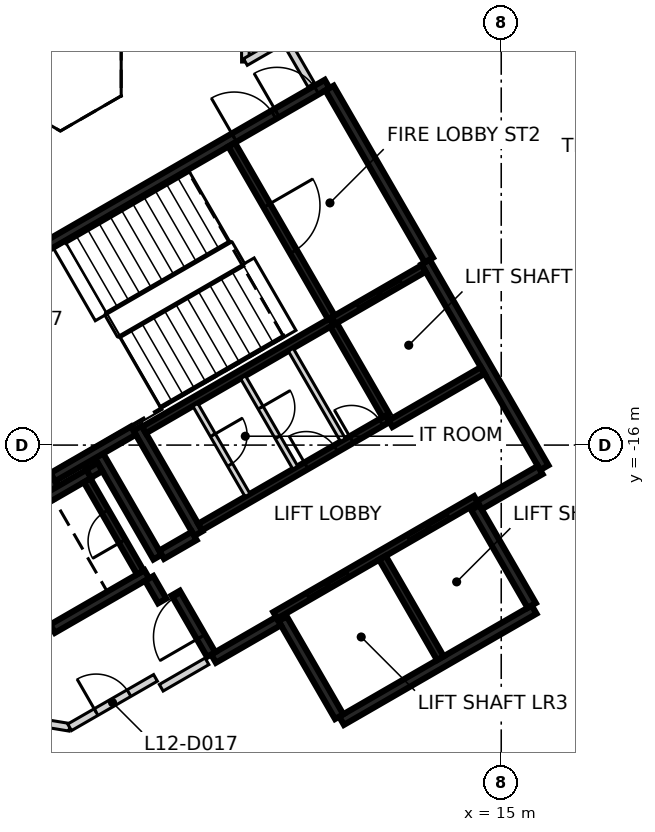
"""IFC4 building model, lengths in metres.
Left out: names, types, materials, properties, quantities, classifications, styles, units other than length and angle.
Written with IfcOpenShell. Run it as: python <this file> out.ifc"""

import sys

from ifc_helpers import new_model, si_unit, direction, frame, frame_2d, origin, place, context, subcontext, project, spatial, rectangle, extrude, element, fill, save


model = new_model("IFC4")
c1 = context("Model", 3, precision=1e-05, world=origin(), true_north=direction((0.0, 1.0)))
c2 = subcontext(c1, "Body", "Model", "MODEL_VIEW")
j1 = project(units=[si_unit("LENGTHUNIT", "METRE"), si_unit("PLANEANGLEUNIT", "RADIAN")], contexts=[c1])
p1 = place(None, origin())
s1 = spatial("IfcSite", under=j1, at=p1, CompositionType="ELEMENT")
p2 = place(p1, origin())
s2 = spatial("IfcBuilding", under=s1, at=p2, CompositionType="ELEMENT")
p3 = place(p2, frame((0.0, 0.0, 56.6)))
s3 = spatial("IfcBuildingStorey", under=s2, at=p3, CompositionType="ELEMENT", Elevation=56.6)
p4 = place(p3, frame((0.417, -12.273, 0.0), z_axis=(0.0, 0.0, 1.0), x_axis=(0.866021906294, 0.500006057782, 0.0)))
e1 = element("IfcWall", 1, at=p4, inside=s3, PredefinedType="SHEAR", context=c2, shape_type="SweptSolid", body=[
    extrude(rectangle(XDim=11.55, YDim=0.25, at=frame_2d((5.775, 0.0))), origin(), (0.0, 0.0, 1.0), 3.125),
])
p5 = place(p4, frame((10.025, 0.0, 0.0)))
e2 = element("IfcOpeningElement", 2, at=p5, cuts=e1, PredefinedType="OPENING", context=c2, shape_type="SweptSolid", body=[
    extrude(rectangle(XDim=1.2, YDim=2.1, at=frame_2d((0.6, 1.05))), frame((0.0, 0.135, 0.0), z_axis=(0.0, -1.0, 0.0), x_axis=(1.0, 0.0, 0.0)), (0.0, 0.0, 1.0), 0.27),
])
p6 = place(p4, frame((8.725, 0.0, 0.0)))
e3 = element("IfcOpeningElement", 3, at=p6, cuts=e1, PredefinedType="OPENING", context=c2, shape_type="SweptSolid", body=[
    extrude(rectangle(XDim=1.2, YDim=2.1, at=frame_2d((0.6, 1.05))), frame((0.0, 0.135, 0.0), z_axis=(0.0, -1.0, 0.0), x_axis=(1.0, 0.0, 0.0)), (0.0, 0.0, 1.0), 0.27),
])
p7 = place(p3, frame((13.008, -11.181, 0.0), z_axis=(0.0, 0.0, 1.0), x_axis=(0.500004234368, -0.866022959057, 0.0)))
e4 = element("IfcWall", 4, at=p7, inside=s3, PredefinedType="SHEAR", context=c2, shape_type="SweptSolid", body=[
    extrude(rectangle(XDim=6.25, YDim=0.25, at=frame_2d((3.125, 0.0))), origin(), (0.0, 0.0, 1.0), 3.125),
])
p8 = place(p3, frame((15.865, -20.328, 0.0), z_axis=(0.0, 0.0, 1.0), x_axis=(-0.86602852612, -0.499994591916, 0.0)))
e5 = element("IfcWall", 5, at=p8, inside=s3, PredefinedType="SHEAR", context=c2, shape_type="SweptSolid", body=[
    extrude(rectangle(XDim=5.85, YDim=0.25, at=frame_2d((2.925, 0.0))), origin(), (0.0, 0.0, 1.0), 3.125),
])
p9 = place(p3, frame((3.235, -17.153, 0.0), z_axis=(0.0, 0.0, 1.0), x_axis=(-0.500008851346, 0.866020293397, 0.0)))
e6 = element("IfcWall", 6, at=p9, inside=s3, PredefinedType="SHEAR", context=c2, shape_type="SweptSolid", body=[
    extrude(rectangle(XDim=5.51, YDim=0.25, at=frame_2d((2.755, 0.0))), origin(), (0.0, 0.0, 1.0), 3.125),
])
p10 = place(p3, frame((10.483, -6.606, 0.0), z_axis=(0.0, 0.0, 1.0), x_axis=(0.49999885962, -0.866026062182, 0.0)))
e7 = element("IfcWall", 7, at=p10, inside=s3, PredefinedType="SHEAR", context=c2, shape_type="SweptSolid", body=[
    extrude(rectangle(XDim=5.225, YDim=0.25, at=frame_2d((2.612, 0.0))), origin(), (0.0, 0.0, 1.0), 3.125),
])
p11 = place(p3, frame((7.031, -18.327, 0.0), z_axis=(0.0, 0.0, 1.0), x_axis=(-0.499971222258, 0.866042017984, 0.0)))
e8 = element("IfcWall", 8, at=p11, inside=s3, PredefinedType="SHEAR", context=c2, shape_type="SweptSolid", body=[
    extrude(rectangle(XDim=3.2, YDim=0.25, at=frame_2d((1.6, 0.0))), origin(), (0.0, 0.0, 1.0), 3.125),
])
for number, where, z_axis, x_axis in (
    (9, (14.315, -17.644, 0.0), (0.0, 0.0, 1.0), (0.5, -0.866, 0.0)),
    (10, (10.736, -23.145, 0.0), (0.0, 0.0, 1.0), (-0.5, 0.866, 0.0)),
):
    element("IfcWall", number, at=place(p3, frame(where, z_axis=z_axis, x_axis=x_axis)), inside=s3, PredefinedType="SHEAR", context=c2, shape_type="SweptSolid", body=[
        extrude(rectangle(XDim=2.974, YDim=0.25, at=frame_2d((1.487, 0.0))), origin(), (0.0, 0.0, 1.0), 3.125),
    ])
p12 = place(p3, frame((3.085, -20.894, 0.0), z_axis=(0.0, 0.0, 1.0), x_axis=(-0.499978833458, 0.866037623948, 0.0)))
e11 = element("IfcWall", 11, at=p12, inside=s3, PredefinedType="SHEAR", context=c2, shape_type="SweptSolid", body=[
    extrude(rectangle(XDim=3.05, YDim=0.25, at=frame_2d((1.525, 0.0))), origin(), (0.0, 0.0, 1.0), 3.125),
])
p13 = place(p3, frame((1.669, -18.19, 0.0), z_axis=(0.0, 0.0, 1.0), x_axis=(0.866042235819, 0.499970844928, 0.0)))
e12 = element("IfcWall", 12, at=p13, inside=s3, PredefinedType="SHEAR", context=c2, shape_type="SweptSolid", body=[
    extrude(rectangle(XDim=2.865, YDim=0.25, at=frame_2d((1.432, 0.0))), origin(), (0.0, 0.0, 1.0), 3.125),
])
p14 = place(p3, frame((5.675, -19.399, 0.0), z_axis=(0.0, 0.0, 1.0), x_axis=(-0.866026637627, -0.499997862916, 0.0)))
e13 = element("IfcWall", 13, at=p14, inside=s3, PredefinedType="SHEAR", context=c2, shape_type="SweptSolid", body=[
    extrude(rectangle(XDim=2.865, YDim=0.25, at=frame_2d((1.432, 0.0))), origin(), (0.0, 0.0, 1.0), 3.125),
])
p15 = place(p3, frame((4.414, -16.276, 0.0), z_axis=(0.0, 0.0, 1.0), x_axis=(0.500003324108, -0.866023484601, 0.0)))
e14 = element("IfcWall", 14, at=p15, inside=s3, PredefinedType="SHEAR", context=c2, shape_type="SweptSolid", body=[
    extrude(rectangle(XDim=3.085, YDim=0.25, at=frame_2d((1.542, 0.0))), origin(), (0.0, 0.0, 1.0), 3.125),
])
p16 = place(p3, frame((5.322, -15.619, 0.0), z_axis=(0.0, 0.0, 1.0), x_axis=(-0.866026229868, -0.499998569178, 0.0)))
e15 = element("IfcWall", 15, at=p16, inside=s3, PredefinedType="SHEAR", context=c2, shape_type="SweptSolid", body=[
    extrude(rectangle(XDim=2.449, YDim=0.25, at=frame_2d((1.225, 0.0))), origin(), (0.0, 0.0, 1.0), 3.125),
])
p17 = place(p3, frame((9.14, -20.631, 0.0), z_axis=(0.0, 0.0, 1.0), x_axis=(-0.866043531843, -0.499968599967, 0.0)))
e16 = element("IfcWall", 16, at=p17, inside=s3, PredefinedType="SHEAR", context=c2, shape_type="SweptSolid", body=[
    extrude(rectangle(XDim=1.975, YDim=0.25, at=frame_2d((0.987, 0.0))), origin(), (0.0, 0.0, 1.0), 3.125),
])
p18 = place(p3, frame((16.025, -16.656, 0.0), z_axis=(0.0, 0.0, 1.0), x_axis=(-0.866016279763, -0.500015802937, 0.0)))
e17 = element("IfcWall", 17, at=p18, inside=s3, PredefinedType="SHEAR", context=c2, shape_type="SweptSolid", body=[
    extrude(rectangle(XDim=1.849, YDim=0.25, at=frame_2d((0.925, 0.0))), origin(), (0.0, 0.0, 1.0), 3.125),
])
p19 = place(p3, frame((7.367, -21.51, 0.0), z_axis=(0.0, 0.0, 1.0), x_axis=(-0.499983108224, 0.866035156036, 0.0)))
e18 = element("IfcWall", 18, at=p19, inside=s3, PredefinedType="SHEAR", context=c2, shape_type="SweptSolid", body=[
    extrude(rectangle(XDim=1.865, YDim=0.25, at=frame_2d((0.932, 0.0))), origin(), (0.0, 0.0, 1.0), 3.125),
])
p20 = place(p19, frame((0.535, 0.0, 0.0)))
e19 = element("IfcOpeningElement", 19, at=p20, cuts=e18, PredefinedType="OPENING", context=c2, shape_type="SweptSolid", body=[
    extrude(rectangle(XDim=1.25, YDim=2.1, at=frame_2d((0.625, 1.05))), frame((0.0, 0.135, 0.0), z_axis=(0.0, -1.0, 0.0), x_axis=(1.0, 0.0, 0.0)), (0.0, 0.0, 1.0), 0.27),
])
p21 = place(p3, frame((6.065, -18.885, 0.0), z_axis=(0.0, 0.0, 1.0), x_axis=(0.866017078145, 0.500014420154, 0.0)))
e20 = element("IfcWall", 20, at=p21, inside=s3, PredefinedType="SHEAR", context=c2, shape_type="SweptSolid", body=[
    extrude(rectangle(XDim=0.989, YDim=0.25, at=frame_2d((0.495, 0.0))), origin(), (0.0, 0.0, 1.0), 3.125),
])
p22 = place(p3, frame((6.08, -20.1, 0.0), z_axis=(0.0, 0.0, 1.0), x_axis=(-0.500051773299, 0.865995510393, 0.0)))
e21 = element("IfcWall", 21, at=p22, inside=s3, PredefinedType="SHEAR", context=c2, shape_type="SweptSolid", body=[
    extrude(rectangle(XDim=0.685, YDim=0.25, at=frame_2d((0.342, 0.0))), origin(), (0.0, 0.0, 1.0), 3.125),
])
p23 = place(p3, frame((4.145, -16.749, 0.0), z_axis=(0.0, 0.0, 1.0), x_axis=(0.866185586049, 0.49972245349, 0.0)))
e22 = element("IfcWall", 22, at=p23, inside=s3, PredefinedType="SHEAR", context=c2, shape_type="SweptSolid", body=[
    extrude(rectangle(XDim=0.344, YDim=0.25, at=frame_2d((0.172, 0.0))), origin(), (0.0, 0.0, 1.0), 3.125),
])
p24 = place(p3, frame((9.052, -20.48, 0.0), z_axis=(0.0, 0.0, 1.0), x_axis=(0.866030299012, 0.499991521122, 0.0)))
e23 = element("IfcWall", 23, at=p24, inside=s3, PredefinedType="SHEAR", context=c2, shape_type="SweptSolid", body=[
    extrude(rectangle(XDim=6.1, YDim=0.2, at=frame_2d((3.05, 0.0))), origin(), (0.0, 0.0, 1.0), 3.125),
])
p25 = place(p24, frame((1.0, 0.0, 0.0)))
e24 = element("IfcOpeningElement", 24, at=p25, cuts=e23, PredefinedType="OPENING", context=c2, shape_type="SweptSolid", body=[
    extrude(rectangle(XDim=1.2, YDim=2.1, at=frame_2d((0.6, 1.05))), frame((0.0, 0.11, 0.0), z_axis=(0.0, -1.0, 0.0), x_axis=(1.0, 0.0, 0.0)), (0.0, 0.0, 1.0), 0.22),
])
p26 = place(p24, frame((4.05, 0.0, 0.0)))
e25 = element("IfcOpeningElement", 25, at=p26, cuts=e23, PredefinedType="OPENING", context=c2, shape_type="SweptSolid", body=[
    extrude(rectangle(XDim=1.2, YDim=2.1, at=frame_2d((0.6, 1.05))), frame((0.0, 0.11, 0.0), z_axis=(0.0, -1.0, 0.0), x_axis=(1.0, 0.0, 0.0)), (0.0, 0.0, 1.0), 0.22),
])
p27 = place(p3, frame((10.538, -12.752, 0.0), z_axis=(0.0, 0.0, 1.0), x_axis=(-0.866038630372, -0.499977090179, 0.0)))
e26 = element("IfcWall", 26, at=p27, inside=s3, PredefinedType="SHEAR", context=c2, shape_type="SweptSolid", body=[
    extrude(rectangle(XDim=5.699, YDim=0.2, at=frame_2d((2.85, 0.0))), origin(), (0.0, 0.0, 1.0), 3.125),
])
p28 = place(p3, frame((7.077, -18.156, 0.0), z_axis=(0.0, 0.0, 1.0), x_axis=(0.866038630372, 0.499977090179, 0.0)))
e27 = element("IfcWall", 27, at=p28, inside=s3, PredefinedType="SHEAR", context=c2, shape_type="SweptSolid", body=[
    extrude(rectangle(XDim=5.699, YDim=0.2, at=frame_2d((2.85, 0.0))), origin(), (0.0, 0.0, 1.0), 3.125),
])
p29 = place(p28, frame((3.224, 0.0, 0.0)))
e28 = element("IfcOpeningElement", 28, at=p29, cuts=e27, PredefinedType="OPENING", context=c2, shape_type="SweptSolid", body=[
    extrude(rectangle(XDim=0.9, YDim=2.1, at=frame_2d((0.45, 1.05))), frame((0.0, 0.11, 0.0), z_axis=(0.0, -1.0, 0.0), x_axis=(1.0, 0.0, 0.0)), (0.0, 0.0, 1.0), 0.22),
])
p30 = place(p28, frame((4.599, 0.0, 0.0)))
e29 = element("IfcOpeningElement", 29, at=p30, cuts=e27, PredefinedType="OPENING", context=c2, shape_type="SweptSolid", body=[
    extrude(rectangle(XDim=0.9, YDim=2.1, at=frame_2d((0.45, 1.05))), frame((0.0, 0.11, 0.0), z_axis=(0.0, -1.0, 0.0), x_axis=(1.0, 0.0, 0.0)), (0.0, 0.0, 1.0), 0.22),
])
p31 = place(p3, frame((7.906, -8.094, 0.0), z_axis=(0.0, 0.0, 1.0), x_axis=(0.500024287448, -0.866011380966, 0.0)))
e30 = element("IfcWall", 30, at=p31, inside=s3, PredefinedType="SHEAR", context=c2, shape_type="SweptSolid", body=[
    extrude(rectangle(XDim=5.251, YDim=0.2, at=frame_2d((2.625, 0.0))), origin(), (0.0, 0.0, 1.0), 3.125),
])
p32 = place(p31, frame((1.849, 0.0, 0.0)))
e31 = element("IfcOpeningElement", 31, at=p32, cuts=e30, PredefinedType="OPENING", context=c2, shape_type="SweptSolid", body=[
    extrude(rectangle(XDim=1.4, YDim=2.1, at=frame_2d((0.7, 1.05))), frame((0.0, 0.11, 0.0), z_axis=(0.0, -1.0, 0.0), x_axis=(1.0, 0.0, 0.0)), (0.0, 0.0, 1.0), 0.22),
])
p33 = place(p3, frame((11.875, -18.967, 0.0), z_axis=(0.0, 0.0, 1.0), x_axis=(0.49998131003, -0.866036194175, 0.0)))
e32 = element("IfcWall", 32, at=p33, inside=s3, PredefinedType="SHEAR", context=c2, shape_type="SweptSolid", body=[
    extrude(rectangle(XDim=3.048, YDim=0.2, at=frame_2d((1.524, 0.0))), origin(), (0.0, 0.0, 1.0), 3.125),
])
p34 = place(p3, frame((5.503, -19.352, 0.0), z_axis=(0.0, 0.0, 1.0), x_axis=(-0.499986818241, 0.866033014143, 0.0)))
e33 = element("IfcWall", 33, at=p34, inside=s3, PredefinedType="SHEAR", context=c2, shape_type="SweptSolid", body=[
    extrude(rectangle(XDim=2.798, YDim=0.2, at=frame_2d((1.399, 0.0))), origin(), (0.0, 0.0, 1.0), 3.125),
])
p35 = place(p34, frame((0.949, 0.0, 0.0)))
e34 = element("IfcOpeningElement", 34, at=p35, cuts=e33, PredefinedType="OPENING", context=c2, shape_type="SweptSolid", body=[
    extrude(rectangle(XDim=0.9, YDim=2.1, at=frame_2d((0.45, 1.05))), frame((0.0, 0.11, 0.0), z_axis=(0.0, -1.0, 0.0), x_axis=(1.0, 0.0, 0.0)), (0.0, 0.0, 1.0), 0.22),
])
p36 = place(p3, frame((11.963, -15.22, 0.0), z_axis=(0.0, 0.0, 1.0), x_axis=(-0.500034990121, 0.866005201286, 0.0)))
e35 = element("IfcWall", 35, at=p36, inside=s3, PredefinedType="SHEAR", context=c2, shape_type="SweptSolid", body=[
    extrude(rectangle(XDim=2.75, YDim=0.2, at=frame_2d((1.375, 0.0))), origin(), (0.0, 0.0, 1.0), 3.125),
])
p37 = place(p3, frame((10.587, -12.723, 0.0), z_axis=(0.0, 0.0, 1.0), x_axis=(0.866037306777, 0.499979382845, 0.0)))
e36 = element("IfcWall", 36, at=p37, inside=s3, PredefinedType="SHEAR", context=c2, shape_type="SweptSolid", body=[
    extrude(rectangle(XDim=2.742, YDim=0.2, at=frame_2d((1.371, 0.0))), origin(), (0.0, 0.0, 1.0), 3.125),
])
p38 = place(p37, frame((0.743, 0.0, 0.0)))
e37 = element("IfcOpeningElement", 37, at=p38, cuts=e36, PredefinedType="OPENING", context=c2, shape_type="SweptSolid", body=[
    extrude(rectangle(XDim=1.3, YDim=2.1, at=frame_2d((0.65, 1.05))), frame((0.0, 0.11, 0.0), z_axis=(0.0, -1.0, 0.0), x_axis=(1.0, 0.0, 0.0)), (0.0, 0.0, 1.0), 0.22),
])
p39 = place(p3, frame((14.512, -14.037, 0.0), z_axis=(0.0, 0.0, 1.0), x_axis=(-0.866044696403, -0.499966582715, 0.0)))
e38 = element("IfcWall", 38, at=p39, inside=s3, PredefinedType="SHEAR", context=c2, shape_type="SweptSolid", body=[
    extrude(rectangle(XDim=2.799, YDim=0.2, at=frame_2d((1.399, 0.0))), origin(), (0.0, 0.0, 1.0), 3.125),
])
p40 = place(p3, frame((8.207, -14.214, 0.0), z_axis=(0.0, 0.0, 1.0), x_axis=(0.50002746344, -0.86600954718, 0.0)))
e39 = element("IfcWall", 39, at=p40, inside=s3, PredefinedType="PARTITIONING", context=c2, shape_type="SweptSolid", body=[
    extrude(rectangle(XDim=2.748, YDim=0.15, at=frame_2d((1.374, 0.0))), origin(), (0.0, 0.0, 1.0), 3.125),
])
p41 = place(p40, frame((0.924, 0.0, 0.0)))
e40 = element("IfcOpeningElement", 40, at=p41, cuts=e39, PredefinedType="OPENING", context=c2, shape_type="SweptSolid", body=[
    extrude(rectangle(XDim=0.9, YDim=2.1, at=frame_2d((0.45, 1.05))), frame((0.0, 0.085, 0.0), z_axis=(0.0, -1.0, 0.0), x_axis=(1.0, 0.0, 0.0)), (0.0, 0.0, 1.0), 0.17),
])
p42 = place(p3, frame((9.462, -13.489, 0.0), z_axis=(0.0, 0.0, 1.0), x_axis=(0.499988999718, -0.866031754707, 0.0)))
e41 = element("IfcWall", 41, at=p42, inside=s3, PredefinedType="PARTITIONING", context=c2, shape_type="SweptSolid", body=[
    extrude(rectangle(XDim=2.749, YDim=0.15, at=frame_2d((1.374, 0.0))), origin(), (0.0, 0.0, 1.0), 3.125),
])
p43 = place(p3, frame((6.951, -14.939, 0.0), z_axis=(0.0, 0.0, 1.0), x_axis=(0.499988999718, -0.866031754707, 0.0)))
e42 = element("IfcWall", 42, at=p43, inside=s3, PredefinedType="PARTITIONING", context=c2, shape_type="SweptSolid", body=[
    extrude(rectangle(XDim=2.749, YDim=0.15, at=frame_2d((1.374, 0.0))), origin(), (0.0, 0.0, 1.0), 3.125),
])
p44 = place(p43, frame((0.924, 0.0, 0.0)))
e43 = element("IfcOpeningElement", 43, at=p44, cuts=e42, PredefinedType="OPENING", context=c2, shape_type="SweptSolid", body=[
    extrude(rectangle(XDim=0.9, YDim=2.1, at=frame_2d((0.45, 1.05))), frame((0.0, 0.085, 0.0), z_axis=(0.0, -1.0, 0.0), x_axis=(1.0, 0.0, 0.0)), (0.0, 0.0, 1.0), 0.17),
])
p45 = place(p3, frame((1.584, -23.086, 0.0), z_axis=(0.0, 0.0, 1.0), x_axis=(0.986633159246, -0.162957077405, 0.0)))
e44 = element("IfcWall", 44, at=p45, inside=s3, PredefinedType="PARTITIONING", context=c2, shape_type="SweptSolid", body=[
    extrude(rectangle(XDim=2.087, YDim=0.2, at=frame_2d((1.043, 0.0))), origin(), (0.0, 0.0, 1.0), 3.125),
])
p46 = place(p3, frame((3.643, -23.426, 0.0), z_axis=(0.0, 0.0, 1.0), x_axis=(0.866654350985, 0.498909045738, 0.0)))
e45 = element("IfcWall", 45, at=p46, inside=s3, PredefinedType="PARTITIONING", context=c2, shape_type="SweptSolid", body=[
    extrude(rectangle(XDim=2.608, YDim=0.2, at=frame_2d((1.304, 0.0))), origin(), (0.0, 0.0, 1.0), 3.125),
])
p47 = place(p46, frame((0.804, 0.0, 0.0)))
e46 = element("IfcOpeningElement", 46, at=p47, cuts=e45, PredefinedType="OPENING", context=c2, shape_type="SweptSolid", body=[
    extrude(rectangle(XDim=1.0, YDim=2.1, at=frame_2d((0.5, 1.05))), frame((0.0, 0.11, 0.0), z_axis=(0.0, -1.0, 0.0), x_axis=(1.0, 0.0, 0.0)), (0.0, 0.0, 1.0), 0.22),
])
p48 = place(p3, frame((6.054, -22.385, 0.0), z_axis=(0.0, 0.0, 1.0), x_axis=(0.86593101922, 0.500163443238, 0.0)))
e47 = element("IfcWall", 47, at=p48, inside=s3, PredefinedType="PARTITIONING", context=c2, shape_type="SweptSolid", body=[
    extrude(rectangle(XDim=1.39, YDim=0.2, at=frame_2d((0.695, 0.0))), origin(), (0.0, 0.0, 1.0), 3.125),
])
p49 = place(p3, frame((8.268, -5.921, 0.0), z_axis=(0.0, 0.0, 1.0), x_axis=(0.0, 1.0, 0.0)))
e48 = element("IfcWall", 48, at=p49, inside=s3, PredefinedType="PARTITIONING", context=c2, shape_type="SweptSolid", body=[
    extrude(rectangle(XDim=1.2, YDim=0.2, at=frame_2d((0.6, 0.0))), origin(), (0.0, 0.0, 1.0), 3.125),
])
p50 = place(p3, frame((8.268, -5.921, 0.0), z_axis=(0.0, 0.0, 1.0), x_axis=(0.866344856625, 0.499446282797, 0.0)))
e49 = element("IfcWall", 49, at=p50, inside=s3, PredefinedType="PARTITIONING", context=c2, shape_type="SweptSolid", body=[
    extrude(rectangle(XDim=1.199, YDim=0.2, at=frame_2d((0.6, 0.0))), origin(), (0.0, 0.0, 1.0), 3.125),
])
p51 = place(p3, frame((9.307, -5.322, 0.0), z_axis=(0.0, 0.0, 1.0), x_axis=(0.500295157811, -0.865854927266, 0.0)))
e50 = element("IfcWall", 50, at=p51, inside=s3, PredefinedType="PARTITIONING", context=c2, shape_type="SweptSolid", body=[
    extrude(rectangle(XDim=1.39, YDim=0.2, at=frame_2d((0.695, 0.0))), origin(), (0.0, 0.0, 1.0), 3.125),
])
p52 = place(p38, origin())
e51 = element("IfcDoor", 51, at=p52, inside=s3, OperationType="SLIDING_TO_LEFT", PredefinedType="DOOR", context=c2, shape_type="SweptSolid", body=[
    extrude(rectangle(XDim=1.3, YDim=2.1, at=frame_2d((0.65, 1.05))), frame((0.0, 0.025, 0.0), z_axis=(0.0, -1.0, 0.0), x_axis=(1.0, 0.0, 0.0)), (0.0, 0.0, 1.0), 0.05),
])
fill(e37, e51)
p53 = place(p25, origin())
e52 = element("IfcDoor", 52, at=p53, inside=s3, OperationType="DOUBLE_DOOR_SLIDING", PredefinedType="DOOR", context=c2, shape_type="SweptSolid", body=[
    extrude(rectangle(XDim=1.2, YDim=2.1, at=frame_2d((0.6, 1.05))), frame((0.0, 0.025, 0.0), z_axis=(0.0, -1.0, 0.0), x_axis=(1.0, 0.0, 0.0)), (0.0, 0.0, 1.0), 0.05),
])
fill(e24, e52)
p54 = place(p26, origin())
e53 = element("IfcDoor", 53, at=p54, inside=s3, OperationType="DOUBLE_DOOR_SLIDING", PredefinedType="DOOR", context=c2, shape_type="SweptSolid", body=[
    extrude(rectangle(XDim=1.2, YDim=2.1, at=frame_2d((0.6, 1.05))), frame((0.0, 0.025, 0.0), z_axis=(0.0, -1.0, 0.0), x_axis=(1.0, 0.0, 0.0)), (0.0, 0.0, 1.0), 0.05),
])
fill(e25, e53)
p55 = place(p20, origin())
e54 = element("IfcDoor", 54, at=p55, inside=s3, OperationType="SINGLE_SWING_LEFT", PredefinedType="DOOR", context=c2, shape_type="SweptSolid", body=[
    extrude(rectangle(XDim=1.25, YDim=2.1, at=frame_2d((0.625, 1.05))), frame((0.0, 0.025, 0.0), z_axis=(0.0, -1.0, 0.0), x_axis=(1.0, 0.0, 0.0)), (0.0, 0.0, 1.0), 0.05),
])
fill(e19, e54)
p56 = place(p5, origin())
e55 = element("IfcDoor", 55, at=p56, inside=s3, OperationType="SINGLE_SWING_LEFT", PredefinedType="DOOR", context=c2, shape_type="SweptSolid", body=[
    extrude(rectangle(XDim=1.2, YDim=2.1, at=frame_2d((0.6, 1.05))), frame((0.0, 0.025, 0.0), z_axis=(0.0, -1.0, 0.0), x_axis=(1.0, 0.0, 0.0)), (0.0, 0.0, 1.0), 0.05),
])
fill(e2, e55)
p57 = place(p6, origin())
e56 = element("IfcDoor", 56, at=p57, inside=s3, OperationType="SINGLE_SWING_RIGHT", PredefinedType="DOOR", context=c2, shape_type="SweptSolid", body=[
    extrude(rectangle(XDim=1.2, YDim=2.1, at=frame_2d((0.6, 1.05))), frame((0.0, 0.025, 0.0), z_axis=(0.0, -1.0, 0.0), x_axis=(1.0, 0.0, 0.0)), (0.0, 0.0, 1.0), 0.05),
])
fill(e3, e56)
p58 = place(p32, origin())
e57 = element("IfcDoor", 57, at=p58, inside=s3, OperationType="SINGLE_SWING_LEFT", PredefinedType="DOOR", context=c2, shape_type="SweptSolid", body=[
    extrude(rectangle(XDim=1.4, YDim=2.1, at=frame_2d((0.7, 1.05))), frame((0.0, 0.025, 0.0), z_axis=(0.0, -1.0, 0.0), x_axis=(1.0, 0.0, 0.0)), (0.0, 0.0, 1.0), 0.05),
])
fill(e31, e57)
p59 = place(p29, origin())
e58 = element("IfcDoor", 58, at=p59, inside=s3, OperationType="SINGLE_SWING_RIGHT", PredefinedType="DOOR", context=c2, shape_type="SweptSolid", body=[
    extrude(rectangle(XDim=0.9, YDim=2.1, at=frame_2d((0.45, 1.05))), frame((0.0, 0.025, 0.0), z_axis=(0.0, -1.0, 0.0), x_axis=(1.0, 0.0, 0.0)), (0.0, 0.0, 1.0), 0.05),
])
fill(e28, e58)
p60 = place(p30, origin())
e59 = element("IfcDoor", 59, at=p60, inside=s3, OperationType="SINGLE_SWING_LEFT", PredefinedType="DOOR", context=c2, shape_type="SweptSolid", body=[
    extrude(rectangle(XDim=0.9, YDim=2.1, at=frame_2d((0.45, 1.05))), frame((0.0, 0.025, 0.0), z_axis=(0.0, -1.0, 0.0), x_axis=(1.0, 0.0, 0.0)), (0.0, 0.0, 1.0), 0.05),
])
fill(e29, e59)
p61 = place(p35, origin())
e60 = element("IfcDoor", 60, at=p61, inside=s3, OperationType="SINGLE_SWING_RIGHT", PredefinedType="DOOR", context=c2, shape_type="SweptSolid", body=[
    extrude(rectangle(XDim=0.9, YDim=2.1, at=frame_2d((0.45, 1.05))), frame((0.0, 0.025, 0.0), z_axis=(0.0, -1.0, 0.0), x_axis=(1.0, 0.0, 0.0)), (0.0, 0.0, 1.0), 0.05),
])
fill(e34, e60)
p62 = place(p41, origin())
e61 = element("IfcDoor", 61, at=p62, inside=s3, OperationType="SINGLE_SWING_LEFT", PredefinedType="DOOR", context=c2, shape_type="SweptSolid", body=[
    extrude(rectangle(XDim=0.9, YDim=2.1, at=frame_2d((0.45, 1.05))), frame((0.0, 0.025, 0.0), z_axis=(0.0, -1.0, 0.0), x_axis=(1.0, 0.0, 0.0)), (0.0, 0.0, 1.0), 0.05),
])
fill(e40, e61)
p63 = place(p44, origin())
e62 = element("IfcDoor", 62, at=p63, inside=s3, OperationType="SINGLE_SWING_RIGHT", PredefinedType="DOOR", context=c2, shape_type="SweptSolid", body=[
    extrude(rectangle(XDim=0.9, YDim=2.1, at=frame_2d((0.45, 1.05))), frame((0.0, 0.025, 0.0), z_axis=(0.0, -1.0, 0.0), x_axis=(1.0, 0.0, 0.0)), (0.0, 0.0, 1.0), 0.05),
])
fill(e43, e62)
p64 = place(p47, frame((1.0, 0.0, 0.0), z_axis=(0.0, 0.0, 1.0), x_axis=(-1.0, 0.0, 0.0)))
e63 = element("IfcDoor", 63, at=p64, inside=s3, OperationType="SINGLE_SWING_LEFT", PredefinedType="DOOR", context=c2, shape_type="SweptSolid", body=[
    extrude(rectangle(XDim=1.0, YDim=2.1, at=frame_2d((0.5, 1.05))), frame((0.0, 0.025, 0.0), z_axis=(0.0, -1.0, 0.0), x_axis=(1.0, 0.0, 0.0)), (0.0, 0.0, 1.0), 0.05),
])
fill(e46, e63)
save(model, sys.argv[1])
